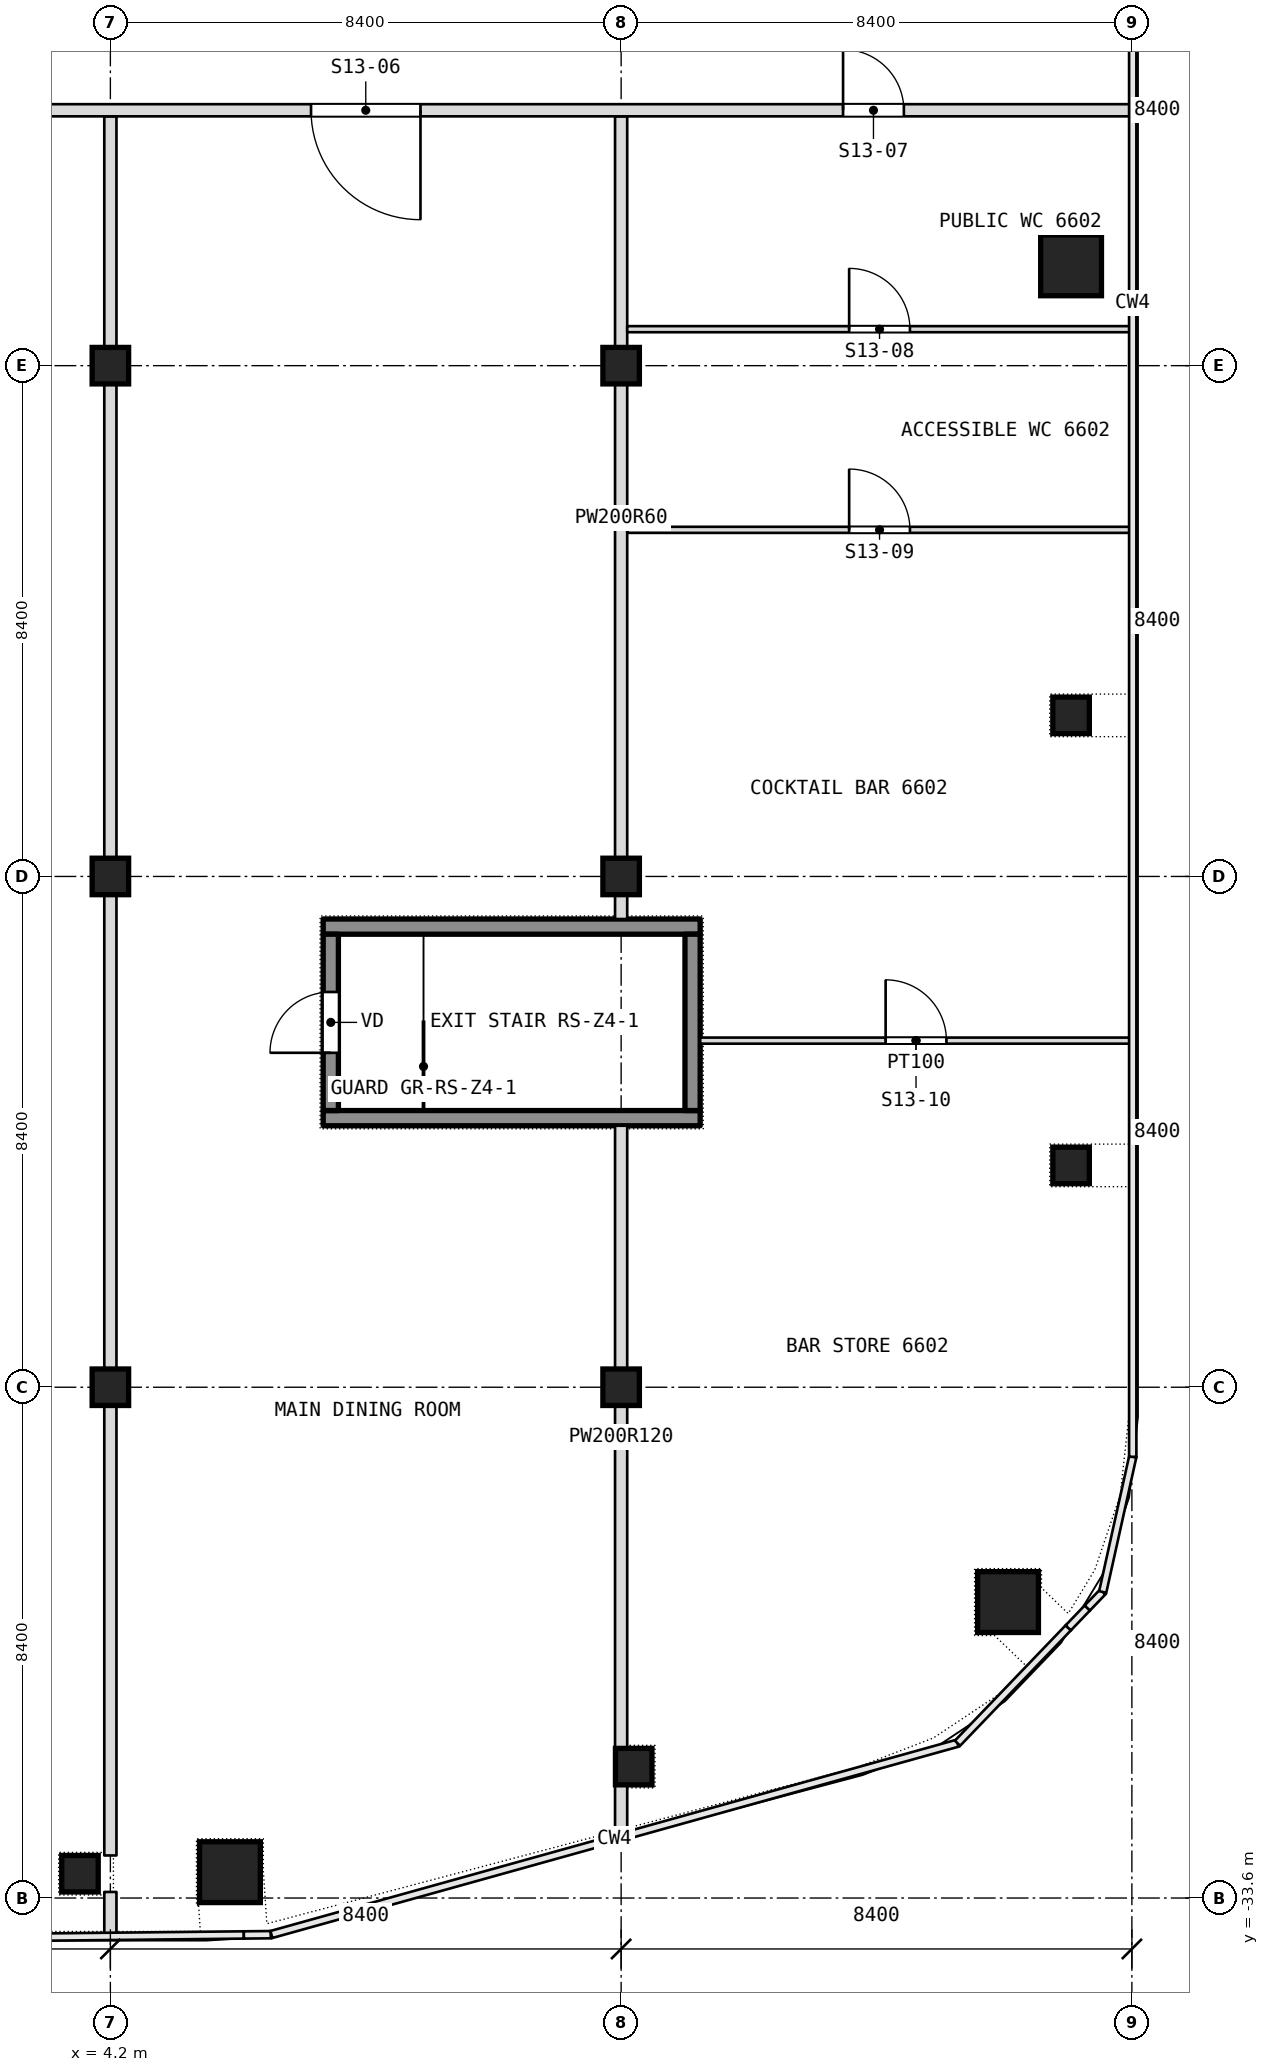
"""IFC4 building model, lengths in metres.
Left out: names, types, materials, properties, quantities, classifications, styles, units other than length and angle.
Written with IfcOpenShell. Run it as: python <this file> out.ifc"""

import sys

from ifc_helpers import new_model, si_unit, direction, frame, frame_2d, origin, origin_2d, place, context, subcontext, project, spatial, rectangle, extrude, element, fill, save


model = new_model("IFC4")
c1 = context("Model", 3, precision=1e-05, world=origin(), true_north=direction((0.0, 1.0)))
c2 = subcontext(c1, "Body", "Model", "MODEL_VIEW")
j1 = project(units=[si_unit("LENGTHUNIT", "METRE"), si_unit("PLANEANGLEUNIT", "RADIAN")], contexts=[c1])
p1 = place(None, origin())
s1 = spatial("IfcSite", under=j1, at=p1, CompositionType="ELEMENT")
p2 = place(p1, origin())
s2 = spatial("IfcBuilding", under=s1, at=p2, CompositionType="ELEMENT")
p3 = place(p2, frame((0.0, 0.0, 288.5)))
s3 = spatial("IfcBuildingStorey", under=s2, at=p3, CompositionType="ELEMENT", Elevation=288.5)
for number, where, z_axis, x_axis in (
    (1, (6.166, -33.175, 0.0), (0.0, 0.0, 1.0), (1.0, 0.0, 0.0)),
    (2, (18.963, -28.733, 0.0), (0.0, 0.0, 1.0), (1.0, 0.0, 0.0)),
    (3, (20.0, -6.75, 0.0), (0.0, 0.0, 1.0), (1.0, 0.0, 0.0)),
):
    element("IfcColumn", number, at=place(p3, frame(where, z_axis=z_axis, x_axis=x_axis)), inside=s3, PredefinedType="COLUMN", context=c2, shape_type="SweptSolid", body=[
        extrude(rectangle(XDim=1.0, YDim=1.0, at=origin_2d()), origin(), (0.0, 0.0, 1.0), 6.9),
    ])
for number, where, z_axis, x_axis in (
    (4, (4.2, -25.2, 0.0), (0.0, 0.0, 1.0), (1.0, 0.0, 0.0)),
    (5, (4.2, -16.8, 0.0), (0.0, 0.0, 1.0), (1.0, 0.0, 0.0)),
    (6, (4.2, -8.4, 0.0), (0.0, 0.0, 1.0), (1.0, 0.0, 0.0)),
    (7, (12.6, -25.2, 0.0), (0.0, 0.0, 1.0), (1.0, 0.0, 0.0)),
    (8, (12.6, -16.8, 0.0), (0.0, 0.0, 1.0), (1.0, 0.0, 0.0)),
    (9, (12.6, -8.4, 0.0), (0.0, 0.0, 1.0), (1.0, 0.0, 0.0)),
    (10, (20.0, -14.151, 0.0), (0.0, 0.0, 1.0), (1.0, 0.0, 0.0)),
    (11, (20.0, -21.552, 0.0), (0.0, 0.0, 1.0), (1.0, 0.0, 0.0)),
    (12, (12.807, -31.439, 0.0), (0.0, 0.0, 1.0), (1.0, 0.0, 0.0)),
    (13, (3.7, -33.2, 0.0), (0.0, 0.0, 1.0), (1.0, 0.0, 0.0)),
):
    element("IfcColumn", number, at=place(p3, frame(where, z_axis=z_axis, x_axis=x_axis)), inside=s3, PredefinedType="COLUMN", context=c2, shape_type="SweptSolid", body=[
        extrude(rectangle(XDim=0.6, YDim=0.6, at=origin_2d()), origin(), (0.0, 0.0, 1.0), 6.9),
    ])
p4 = place(p3, frame((13.9, -19.5, 0.0), z_axis=(0.0, 0.0, 1.0), x_axis=(1.0, 0.0, 0.0)))
e14 = element("IfcWall", 14, at=p4, inside=s3, PredefinedType="PARTITIONING", context=c2, shape_type="SweptSolid", body=[
    extrude(rectangle(XDim=7.1, YDim=0.1, at=frame_2d((3.55, 0.0))), origin(), (0.0, 0.0, 1.0), 6.9),
])
p5 = place(p4, frame((3.05, 0.0, 0.0)))
e15 = element("IfcOpeningElement", 15, at=p5, cuts=e14, PredefinedType="OPENING", context=c2, shape_type="SweptSolid", body=[
    extrude(rectangle(XDim=1.0, YDim=2.1, at=frame_2d((0.5, 1.05))), frame((0.0, 0.05, 0.0), z_axis=(0.0, -1.0, 0.0), x_axis=(1.0, 0.0, 0.0)), (0.0, 0.0, 1.0), 0.1),
])
p6 = place(p3, frame((12.6, -32.529, 0.0), z_axis=(0.0, 0.0, 1.0), x_axis=(0.0, 1.0, 0.0)))
e16 = element("IfcWall", 16, at=p6, inside=s3, PredefinedType="PARTITIONING", context=c2, shape_type="SweptSolid", body=[
    extrude(rectangle(XDim=0.79, YDim=0.2, at=frame_2d((0.395, 0.0))), origin(), (0.0, 0.0, 1.0), 6.9),
])
p7 = place(p3, frame((12.6, -31.139, 0.0), z_axis=(0.0, 0.0, 1.0), x_axis=(0.0, 1.0, 0.0)))
e17 = element("IfcWall", 17, at=p7, inside=s3, PredefinedType="PARTITIONING", context=c2, shape_type="SweptSolid", body=[
    extrude(rectangle(XDim=10.239, YDim=0.2, at=frame_2d((5.12, 0.0))), origin(), (0.0, 0.0, 1.0), 6.9),
])
p8 = place(p3, frame((12.6, -17.5, 0.0), z_axis=(0.0, 0.0, 1.0), x_axis=(0.0, 1.0, 0.0)))
e18 = element("IfcWall", 18, at=p8, inside=s3, PredefinedType="PARTITIONING", context=c2, shape_type="SweptSolid", body=[
    extrude(rectangle(XDim=13.2, YDim=0.2, at=frame_2d((6.6, 0.0))), origin(), (0.0, 0.0, 1.0), 6.9),
])
p9 = place(p3, frame((12.7, -11.1, 0.0), z_axis=(0.0, 0.0, 1.0), x_axis=(1.0, 0.0, 0.0)))
e19 = element("IfcWall", 19, at=p9, inside=s3, PredefinedType="PARTITIONING", context=c2, shape_type="SweptSolid", body=[
    extrude(rectangle(XDim=8.3, YDim=0.1, at=frame_2d((4.15, 0.0))), origin(), (0.0, 0.0, 1.0), 6.9),
])
p10 = place(p9, frame((3.65, 0.0, 0.0)))
e20 = element("IfcOpeningElement", 20, at=p10, cuts=e19, PredefinedType="OPENING", context=c2, shape_type="SweptSolid", body=[
    extrude(rectangle(XDim=1.0, YDim=2.1, at=frame_2d((0.5, 1.05))), frame((0.0, 0.05, 0.0), z_axis=(0.0, -1.0, 0.0), x_axis=(1.0, 0.0, 0.0)), (0.0, 0.0, 1.0), 0.1),
])
p11 = place(p3, frame((12.7, -7.8, 0.0), z_axis=(0.0, 0.0, 1.0), x_axis=(1.0, 0.0, 0.0)))
e21 = element("IfcWall", 21, at=p11, inside=s3, PredefinedType="PARTITIONING", context=c2, shape_type="SweptSolid", body=[
    extrude(rectangle(XDim=8.3, YDim=0.1, at=frame_2d((4.15, 0.0))), origin(), (0.0, 0.0, 1.0), 6.9),
])
p12 = place(p11, frame((3.65, 0.0, 0.0)))
e22 = element("IfcOpeningElement", 22, at=p12, cuts=e21, PredefinedType="OPENING", context=c2, shape_type="SweptSolid", body=[
    extrude(rectangle(XDim=1.0, YDim=2.1, at=frame_2d((0.5, 1.05))), frame((0.0, 0.05, 0.0), z_axis=(0.0, -1.0, 0.0), x_axis=(1.0, 0.0, 0.0)), (0.0, 0.0, 1.0), 0.1),
])
p13 = place(p3, frame((4.2, -34.2, 0.0), z_axis=(0.0, 0.0, 1.0), x_axis=(0.0, 1.0, 0.0)))
e23 = element("IfcWall", 23, at=p13, inside=s3, PredefinedType="PARTITIONING", context=c2, shape_type="SweptSolid", body=[
    extrude(rectangle(XDim=0.7, YDim=0.2, at=frame_2d((0.35, 0.0))), origin(), (0.0, 0.0, 1.0), 6.9),
])
p14 = place(p3, frame((4.2, -32.9, 0.0), z_axis=(0.0, 0.0, 1.0), x_axis=(0.0, 1.0, 0.0)))
e24 = element("IfcWall", 24, at=p14, inside=s3, PredefinedType="PARTITIONING", context=c2, shape_type="SweptSolid", body=[
    extrude(rectangle(XDim=28.6, YDim=0.2, at=frame_2d((14.3, 0.0))), origin(), (0.0, 0.0, 1.0), 6.9),
])
p15 = place(p3, frame((-21.0, -4.2, 0.0), z_axis=(0.0, 0.0, 1.0), x_axis=(1.0, 0.0, 0.0)))
e25 = element("IfcWall", 25, at=p15, inside=s3, PredefinedType="PARTITIONING", context=c2, shape_type="SweptSolid", body=[
    extrude(rectangle(XDim=42.0, YDim=0.2, at=frame_2d((21.0, 0.0))), origin(), (0.0, 0.0, 1.0), 6.9),
])
p16 = place(p15, frame((3.75, 0.0, 0.0)))
e26 = element("IfcOpeningElement", 26, at=p16, cuts=e25, PredefinedType="OPENING", context=c2, shape_type="SweptSolid", body=[
    extrude(rectangle(XDim=1.0, YDim=2.1, at=frame_2d((0.5, 1.05))), frame((0.0, 0.1, 0.0), z_axis=(0.0, -1.0, 0.0), x_axis=(1.0, 0.0, 0.0)), (0.0, 0.0, 1.0), 0.2),
])
p17 = place(p15, frame((20.1, 0.0, 0.0)))
e27 = element("IfcOpeningElement", 27, at=p17, cuts=e25, PredefinedType="OPENING", context=c2, shape_type="SweptSolid", body=[
    extrude(rectangle(XDim=1.8, YDim=2.1, at=frame_2d((0.9, 1.05))), frame((0.0, 0.1, 0.0), z_axis=(0.0, -1.0, 0.0), x_axis=(1.0, 0.0, 0.0)), (0.0, 0.0, 1.0), 0.2),
])
p18 = place(p15, frame((11.7, 0.0, 0.0)))
e28 = element("IfcOpeningElement", 28, at=p18, cuts=e25, PredefinedType="OPENING", context=c2, shape_type="SweptSolid", body=[
    extrude(rectangle(XDim=1.8, YDim=2.1, at=frame_2d((0.9, 1.05))), frame((0.0, 0.1, 0.0), z_axis=(0.0, -1.0, 0.0), x_axis=(1.0, 0.0, 0.0)), (0.0, 0.0, 1.0), 0.2),
])
p19 = place(p15, frame((28.5, 0.0, 0.0)))
e29 = element("IfcOpeningElement", 29, at=p19, cuts=e25, PredefinedType="OPENING", context=c2, shape_type="SweptSolid", body=[
    extrude(rectangle(XDim=1.8, YDim=2.1, at=frame_2d((0.9, 1.05))), frame((0.0, 0.1, 0.0), z_axis=(0.0, -1.0, 0.0), x_axis=(1.0, 0.0, 0.0)), (0.0, 0.0, 1.0), 0.2),
])
p20 = place(p15, frame((37.25, 0.0, 0.0)))
e30 = element("IfcOpeningElement", 30, at=p20, cuts=e25, PredefinedType="OPENING", context=c2, shape_type="SweptSolid", body=[
    extrude(rectangle(XDim=1.0, YDim=2.1, at=frame_2d((0.5, 1.05))), frame((0.0, 0.1, 0.0), z_axis=(0.0, -1.0, 0.0), x_axis=(1.0, 0.0, 0.0)), (0.0, 0.0, 1.0), 0.2),
])
for number, where, z_axis, x_axis in (
    (31, (7.7, -20.775, 0.1), (0.0, 0.0, 1.0), (1.0, 0.0, 0.0)),
    (32, (7.7, -17.625, 0.1), (0.0, 0.0, 1.0), (1.0, 0.0, 0.0)),
):
    element("IfcWall", number, at=place(p3, frame(where, z_axis=z_axis, x_axis=x_axis)), inside=s3, PredefinedType="SHEAR", context=c2, shape_type="SweptSolid", body=[
        extrude(rectangle(XDim=6.2, YDim=0.25, at=frame_2d((3.1, 0.0))), origin(), (0.0, 0.0, 1.0), 6.8),
    ])
p21 = place(p3, frame((7.825, -20.65, 0.1), z_axis=(0.0, 0.0, 1.0), x_axis=(0.0, 1.0, 0.0)))
e33 = element("IfcWall", 33, at=p21, inside=s3, PredefinedType="SHEAR", context=c2, shape_type="SweptSolid", body=[
    extrude(rectangle(XDim=2.9, YDim=0.25, at=frame_2d((1.45, 0.0))), origin(), (0.0, 0.0, 1.0), 6.8),
])
p22 = place(p21, frame((0.95, 0.0, 0.0)))
e34 = element("IfcOpeningElement", 34, at=p22, cuts=e33, PredefinedType="OPENING", context=c2, shape_type="SweptSolid", body=[
    extrude(rectangle(XDim=1.0, YDim=2.1, at=frame_2d((0.5, 1.05))), frame((0.0, 0.125, 0.0), z_axis=(0.0, -1.0, 0.0), x_axis=(1.0, 0.0, 0.0)), (0.0, 0.0, 1.0), 0.25),
])
p23 = place(p3, frame((13.775, -20.65, 0.1), z_axis=(0.0, 0.0, 1.0), x_axis=(0.0, 1.0, 0.0)))
e35 = element("IfcWall", 35, at=p23, inside=s3, PredefinedType="SHEAR", context=c2, shape_type="SweptSolid", body=[
    extrude(rectangle(XDim=2.9, YDim=0.25, at=frame_2d((1.45, 0.0))), origin(), (0.0, 0.0, 1.0), 6.8),
])
p24 = place(p5, origin())
e36 = element("IfcDoor", 36, at=p24, inside=s3, OperationType="SINGLE_SWING_LEFT", PredefinedType="DOOR", context=c2, shape_type="SweptSolid", body=[
    extrude(rectangle(XDim=1.0, YDim=2.1, at=frame_2d((0.5, 1.05))), frame((0.0, 0.025, 0.0), z_axis=(0.0, -1.0, 0.0), x_axis=(1.0, 0.0, 0.0)), (0.0, 0.0, 1.0), 0.05),
])
fill(e15, e36)
p25 = place(p10, origin())
e37 = element("IfcDoor", 37, at=p25, inside=s3, OperationType="SINGLE_SWING_LEFT", PredefinedType="DOOR", context=c2, shape_type="SweptSolid", body=[
    extrude(rectangle(XDim=1.0, YDim=2.1, at=frame_2d((0.5, 1.05))), frame((0.0, 0.025, 0.0), z_axis=(0.0, -1.0, 0.0), x_axis=(1.0, 0.0, 0.0)), (0.0, 0.0, 1.0), 0.05),
])
fill(e20, e37)
p26 = place(p12, origin())
e38 = element("IfcDoor", 38, at=p26, inside=s3, OperationType="SINGLE_SWING_LEFT", PredefinedType="DOOR", context=c2, shape_type="SweptSolid", body=[
    extrude(rectangle(XDim=1.0, YDim=2.1, at=frame_2d((0.5, 1.05))), frame((0.0, 0.025, 0.0), z_axis=(0.0, -1.0, 0.0), x_axis=(1.0, 0.0, 0.0)), (0.0, 0.0, 1.0), 0.05),
])
fill(e22, e38)
p27 = place(p19, origin())
e39 = element("IfcDoor", 39, at=p27, inside=s3, OperationType="DOUBLE_DOOR_SINGLE_SWING", PredefinedType="DOOR", context=c2, shape_type="SweptSolid", body=[
    extrude(rectangle(XDim=1.8, YDim=2.1, at=frame_2d((0.9, 1.05))), frame((0.0, 0.025, 0.0), z_axis=(0.0, -1.0, 0.0), x_axis=(1.0, 0.0, 0.0)), (0.0, 0.0, 1.0), 0.05),
])
fill(e29, e39)
p28 = place(p20, origin())
e40 = element("IfcDoor", 40, at=p28, inside=s3, OperationType="SINGLE_SWING_LEFT", PredefinedType="DOOR", context=c2, shape_type="SweptSolid", body=[
    extrude(rectangle(XDim=1.0, YDim=2.1, at=frame_2d((0.5, 1.05))), frame((0.0, 0.025, 0.0), z_axis=(0.0, -1.0, 0.0), x_axis=(1.0, 0.0, 0.0)), (0.0, 0.0, 1.0), 0.05),
])
fill(e30, e40)
p29 = place(p22, origin())
e41 = element("IfcDoor", 41, at=p29, inside=s3, OperationType="SINGLE_SWING_LEFT", PredefinedType="DOOR", context=c2, shape_type="SweptSolid", body=[
    extrude(rectangle(XDim=1.0, YDim=2.1, at=frame_2d((0.5, 1.05))), frame((0.0, 0.025, 0.0), z_axis=(0.0, -1.0, 0.0), x_axis=(1.0, 0.0, 0.0)), (0.0, 0.0, 1.0), 0.05),
])
fill(e34, e41)
save(model, sys.argv[1])
